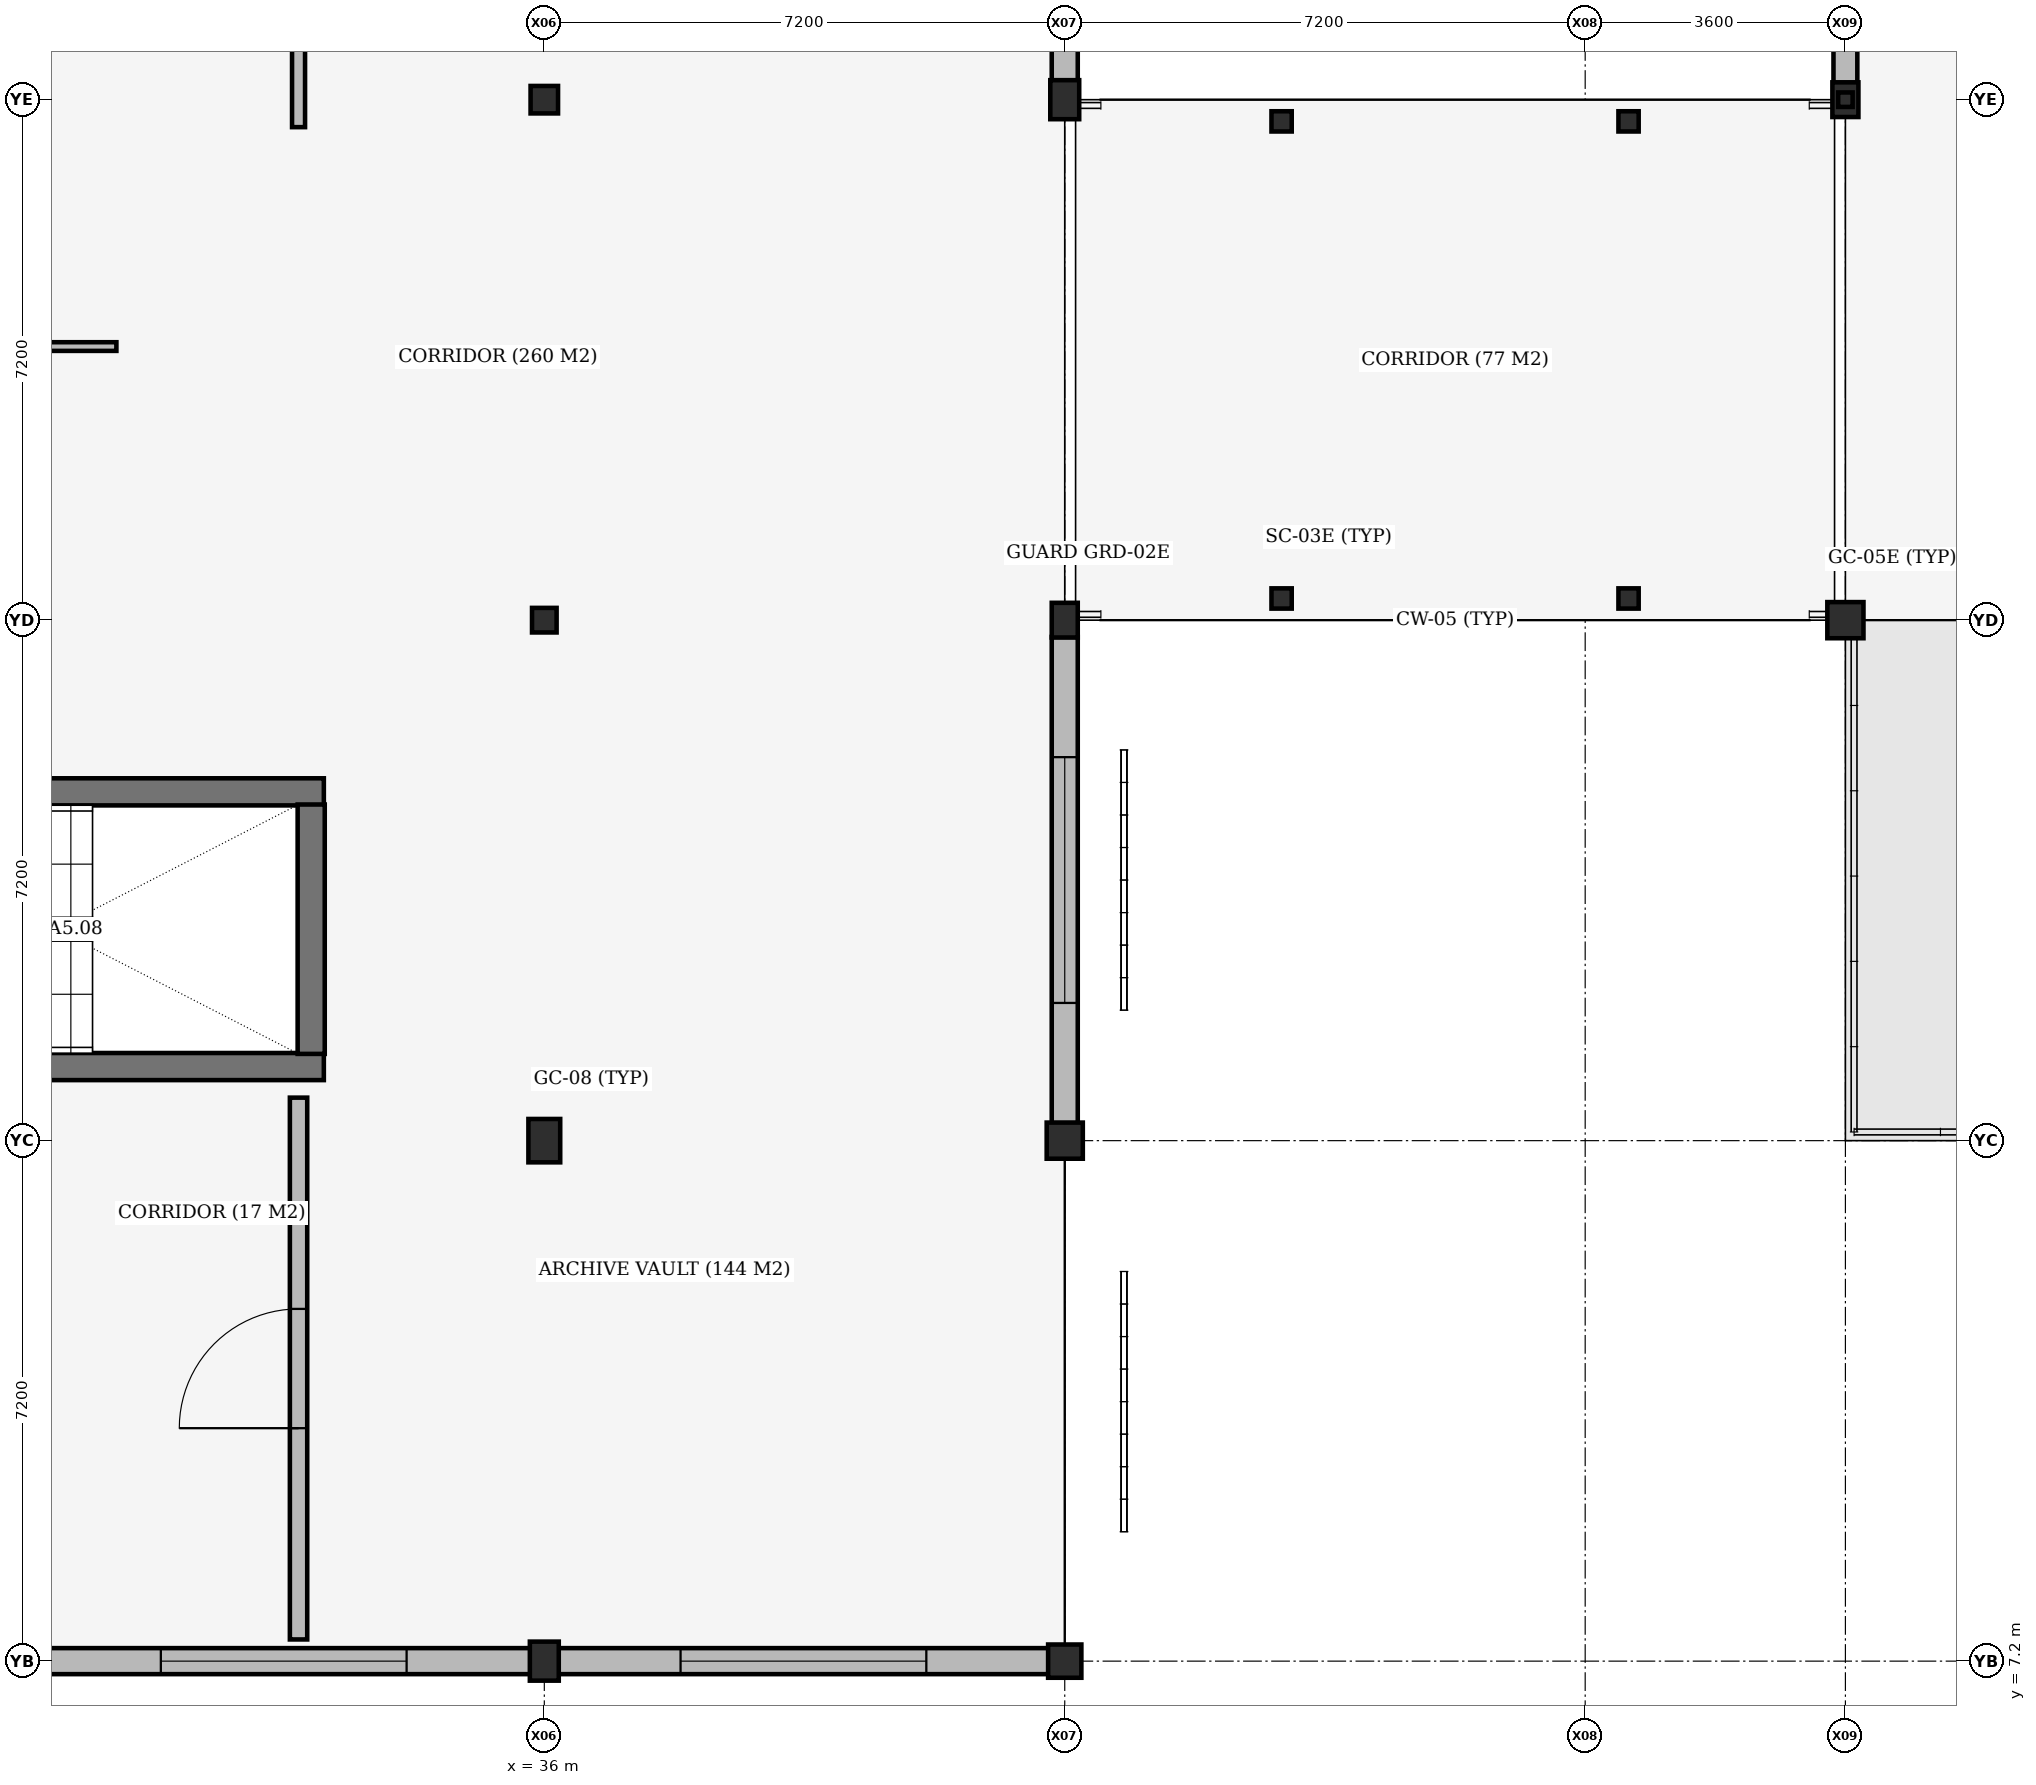
"""IFC4 building model, lengths in metres.
Left out: names, types, materials, properties, quantities, classifications, styles, units other than length and angle.
Written with IfcOpenShell. Run it as: python <this file> out.ifc"""

import sys

from ifc_helpers import new_model, si_unit, direction, frame, frame_2d, origin, origin_2d, place, context, subcontext, project, spatial, rectangle, i_section, extrude, element, fill, save


model = new_model("IFC4")
c1 = context("Model", 3, precision=1e-05, world=origin(), true_north=direction((0.0, 1.0)))
c2 = subcontext(c1, "Body", "Model", "MODEL_VIEW")
j1 = project(units=[si_unit("LENGTHUNIT", "METRE"), si_unit("PLANEANGLEUNIT", "RADIAN")], contexts=[c1])
p1 = place(None, origin())
s1 = spatial("IfcSite", under=j1, at=p1, CompositionType="ELEMENT")
p2 = place(p1, origin())
s2 = spatial("IfcBuilding", under=s1, at=p2, CompositionType="ELEMENT")
p3 = place(p2, frame((0.0, 0.0, 13.8)))
s3 = spatial("IfcBuildingStorey", under=s2, at=p3, CompositionType="ELEMENT", Elevation=13.8)
p4 = place(p3, frame((54.0, 21.6, 0.0), z_axis=(0.0, 0.0, 1.0), x_axis=(1.0, 0.0, 0.0)))
e1 = element("IfcColumn", 1, at=p4, inside=s3, PredefinedType="COLUMN", context=c2, shape_type="SweptSolid", body=[
    extrude(rectangle(XDim=0.5, YDim=0.5, at=origin_2d()), origin(), (0.0, 0.0, 1.0), 3.96),
])
p5 = place(p3, frame((54.0, 28.8, 0.0), z_axis=(0.0, 0.0, 1.0), x_axis=(1.0, 0.0, 0.0)))
e2 = element("IfcColumn", 2, at=p5, inside=s3, PredefinedType="COLUMN", context=c2, shape_type="SweptSolid", body=[
    extrude(rectangle(XDim=0.36, YDim=0.48, at=origin_2d()), origin(), (0.0, 0.0, 1.0), 3.96),
])
p6 = place(p3, frame((36.0, 7.2, 0.0), z_axis=(0.0, 0.0, 1.0), x_axis=(1.0, 0.0, 0.0)))
e3 = element("IfcColumn", 3, at=p6, inside=s3, PredefinedType="COLUMN", context=c2, shape_type="SweptSolid", body=[
    extrude(rectangle(XDim=0.4, YDim=0.54, at=origin_2d()), origin(), (0.0, 0.0, 1.0), 3.92),
])
p7 = place(p3, frame((36.0, 14.4, 0.0), z_axis=(0.0, 0.0, 1.0), x_axis=(1.0, 0.0, 0.0)))
e4 = element("IfcColumn", 4, at=p7, inside=s3, PredefinedType="COLUMN", context=c2, shape_type="SweptSolid", body=[
    extrude(rectangle(XDim=0.44, YDim=0.6, at=origin_2d()), origin(), (0.0, 0.0, 1.0), 3.92),
])
p8 = place(p3, frame((36.0, 21.6, 0.0), z_axis=(0.0, 0.0, 1.0), x_axis=(1.0, 0.0, 0.0)))
e5 = element("IfcColumn", 5, at=p8, inside=s3, PredefinedType="COLUMN", context=c2, shape_type="SweptSolid", body=[
    extrude(rectangle(XDim=0.34, YDim=0.34, at=origin_2d()), origin(), (0.0, 0.0, 1.0), 3.92),
])
p9 = place(p3, frame((36.0, 28.8, 0.0), z_axis=(0.0, 0.0, 1.0), x_axis=(1.0, 0.0, 0.0)))
e6 = element("IfcColumn", 6, at=p9, inside=s3, PredefinedType="COLUMN", context=c2, shape_type="SweptSolid", body=[
    extrude(rectangle(XDim=0.38, YDim=0.38, at=origin_2d()), origin(), (0.0, 0.0, 1.0), 3.92),
])
p10 = place(p3, frame((43.2, 7.2, 0.0), z_axis=(0.0, 0.0, 1.0), x_axis=(1.0, 0.0, 0.0)))
e7 = element("IfcColumn", 7, at=p10, inside=s3, PredefinedType="COLUMN", context=c2, shape_type="SweptSolid", body=[
    extrude(rectangle(XDim=0.46, YDim=0.46, at=origin_2d()), origin(), (0.0, 0.0, 1.0), 3.92),
])
p11 = place(p3, frame((43.2, 14.4, 0.0), z_axis=(0.0, 0.0, 1.0), x_axis=(1.0, 0.0, 0.0)))
e8 = element("IfcColumn", 8, at=p11, inside=s3, PredefinedType="COLUMN", context=c2, shape_type="SweptSolid", body=[
    extrude(rectangle(XDim=0.5, YDim=0.5, at=origin_2d()), origin(), (0.0, 0.0, 1.0), 3.92),
])
p12 = place(p3, frame((43.2, 21.6, 0.0), z_axis=(0.0, 0.0, 1.0), x_axis=(1.0, 0.0, 0.0)))
e9 = element("IfcColumn", 9, at=p12, inside=s3, PredefinedType="COLUMN", context=c2, shape_type="SweptSolid", body=[
    extrude(rectangle(XDim=0.36, YDim=0.48, at=origin_2d()), origin(), (0.0, 0.0, 1.0), 3.92),
])
p13 = place(p3, frame((43.2, 28.8, 0.0), z_axis=(0.0, 0.0, 1.0), x_axis=(1.0, 0.0, 0.0)))
e10 = element("IfcColumn", 10, at=p13, inside=s3, PredefinedType="COLUMN", context=c2, shape_type="SweptSolid", body=[
    extrude(rectangle(XDim=0.4, YDim=0.54, at=origin_2d()), origin(), (0.0, 0.0, 1.0), 3.92),
])
for number, where, z_axis, x_axis in (
    (11, (46.2, 21.9, 0.0), (0.0, 0.0, 1.0), (1.0, 0.0, 0.0)),
    (12, (51.0, 21.9, 0.0), (0.0, 0.0, 1.0), (1.0, 0.0, 0.0)),
    (13, (46.2, 28.5, 0.0), (0.0, 0.0, 1.0), (1.0, 0.0, 0.0)),
    (14, (51.0, 28.5, 0.0), (0.0, 0.0, 1.0), (1.0, 0.0, 0.0)),
):
    element("IfcColumn", number, at=place(p3, frame(where, z_axis=z_axis, x_axis=x_axis)), inside=s3, PredefinedType="COLUMN", context=c2, shape_type="SweptSolid", body=[
        extrude(i_section(OverallWidth=0.28, OverallDepth=0.28, WebThickness=0.01, FlangeThickness=0.018, FilletRadius=0.024, at=origin_2d()), origin(), (0.0, 0.0, 1.0), 3.96),
    ])
for number, where, z_axis, x_axis in (
    (15, (23.85, 15.425, 0.0), (0.0, 0.0, 1.0), (1.0, 0.0, 0.0)),
    (16, (32.95, 19.225, 0.0), (0.0, 0.0, 1.0), (-1.0, 0.0, 0.0)),
):
    element("IfcWall", number, at=place(p3, frame(where, z_axis=z_axis, x_axis=x_axis)), inside=s3, PredefinedType="SHEAR", context=c2, shape_type="SweptSolid", body=[
        extrude(rectangle(XDim=9.1, YDim=0.375, at=frame_2d((4.55, 0.0))), origin(), (0.0, 0.0, 1.0), 3.92),
    ])
p14 = place(p3, frame((32.775, 15.6, 0.0), z_axis=(0.0, 0.0, 1.0), x_axis=(0.0, 1.0, 0.0)))
e17 = element("IfcWall", 17, at=p14, inside=s3, PredefinedType="SHEAR", context=c2, shape_type="SweptSolid", body=[
    extrude(rectangle(XDim=3.45, YDim=0.375, at=frame_2d((1.725, 0.0))), origin(), (0.0, 0.0, 1.0), 3.92),
])
p15 = place(p3, frame((54.0, 28.8, 3.96), z_axis=(0.0, 0.0, 1.0), x_axis=(1.0, 0.0, 0.0)))
e18 = element("IfcColumn", 18, at=p15, inside=s3, PredefinedType="COLUMN", context=c2, shape_type="SweptSolid", body=[
    extrude(i_section(OverallWidth=0.2, OverallDepth=0.2, WebThickness=0.009, FlangeThickness=0.015, FilletRadius=0.018, at=origin_2d()), origin(), (0.0, 0.0, 1.0), 2.235),
])
p16 = place(p3, frame((54.0, 29.032, 0.0), z_axis=(0.0, 0.0, 1.0), x_axis=(0.0, 1.0, 0.0)))
e19 = element("IfcWall", 19, at=p16, inside=s3, PredefinedType="STANDARD", context=c2, shape_type="SweptSolid", body=[
    extrude(rectangle(XDim=6.706, YDim=0.33, at=frame_2d((3.353, 0.0))), origin(), (0.0, 0.0, 1.0), 3.96),
])
p17 = place(p16, frame((1.203, 0.0, 0.85)))
e20 = element("IfcOpeningElement", 20, at=p17, cuts=e19, PredefinedType="OPENING", context=c2, shape_type="SweptSolid", body=[
    extrude(rectangle(XDim=1.75, YDim=2.45, at=frame_2d((0.875, 1.225))), frame((0.0, 0.175, 0.0), z_axis=(0.0, -1.0, 0.0), x_axis=(1.0, 0.0, 0.0)), (0.0, 0.0, 1.0), 0.35),
])
p18 = place(p16, frame((3.753, 0.0, 0.85)))
e21 = element("IfcOpeningElement", 21, at=p18, cuts=e19, PredefinedType="OPENING", context=c2, shape_type="SweptSolid", body=[
    extrude(rectangle(XDim=1.75, YDim=2.45, at=frame_2d((0.875, 1.225))), frame((0.0, 0.175, 0.0), z_axis=(0.0, -1.0, 0.0), x_axis=(1.0, 0.0, 0.0)), (0.0, 0.0, 1.0), 0.35),
])
p19 = place(p3, frame((35.808, 7.2, 0.0), z_axis=(0.0, 0.0, 1.0), x_axis=(-1.0, 0.0, 0.0)))
e22 = element("IfcWall", 22, at=p19, inside=s3, PredefinedType="STANDARD", context=c2, shape_type="SweptSolid", body=[
    extrude(rectangle(XDim=6.826, YDim=0.36, at=frame_2d((3.413, 0.0))), origin(), (0.0, 0.0, 1.0), 3.4),
])
p20 = place(p19, frame((1.713, 0.0, 0.9)))
e23 = element("IfcOpeningElement", 23, at=p20, cuts=e22, PredefinedType="OPENING", context=c2, shape_type="SweptSolid", body=[
    extrude(rectangle(XDim=3.4, YDim=1.5, at=frame_2d((1.7, 0.75))), frame((0.0, 0.19, 0.0), z_axis=(0.0, -1.0, 0.0), x_axis=(1.0, 0.0, 0.0)), (0.0, 0.0, 1.0), 0.38),
])
p21 = place(p3, frame((42.978, 7.2, 0.0), z_axis=(0.0, 0.0, 1.0), x_axis=(-1.0, 0.0, 0.0)))
e24 = element("IfcWall", 24, at=p21, inside=s3, PredefinedType="STANDARD", context=c2, shape_type="SweptSolid", body=[
    extrude(rectangle(XDim=6.786, YDim=0.36, at=frame_2d((3.393, 0.0))), origin(), (0.0, 0.0, 1.0), 3.34),
])
p22 = place(p21, frame((1.693, 0.0, 0.9)))
e25 = element("IfcOpeningElement", 25, at=p22, cuts=e24, PredefinedType="OPENING", context=c2, shape_type="SweptSolid", body=[
    extrude(rectangle(XDim=3.4, YDim=1.5, at=frame_2d((1.7, 0.75))), frame((0.0, 0.19, 0.0), z_axis=(0.0, -1.0, 0.0), x_axis=(1.0, 0.0, 0.0)), (0.0, 0.0, 1.0), 0.38),
])
p23 = place(p3, frame((43.2, 21.368, 0.0), z_axis=(0.0, 0.0, 1.0), x_axis=(0.0, -1.0, 0.0)))
e26 = element("IfcWall", 26, at=p23, inside=s3, PredefinedType="STANDARD", context=c2, shape_type="SweptSolid", body=[
    extrude(rectangle(XDim=6.726, YDim=0.36, at=frame_2d((3.363, 0.0))), origin(), (0.0, 0.0, 1.0), 3.18),
])
p24 = place(p23, frame((1.663, 0.0, 0.9)))
e27 = element("IfcOpeningElement", 27, at=p24, cuts=e26, PredefinedType="OPENING", context=c2, shape_type="SweptSolid", body=[
    extrude(rectangle(XDim=3.4, YDim=1.5, at=frame_2d((1.7, 0.75))), frame((0.0, 0.19, 0.0), z_axis=(0.0, -1.0, 0.0), x_axis=(1.0, 0.0, 0.0)), (0.0, 0.0, 1.0), 0.38),
])
p25 = place(p3, frame((43.2, 35.708, 0.0), z_axis=(0.0, 0.0, 1.0), x_axis=(0.0, -1.0, 0.0)))
e28 = element("IfcWall", 28, at=p25, inside=s3, PredefinedType="STANDARD", context=c2, shape_type="SweptSolid", body=[
    extrude(rectangle(XDim=6.646, YDim=0.36, at=frame_2d((3.323, 0.0))), origin(), (0.0, 0.0, 1.0), 3.34),
])
p26 = place(p25, frame((1.573, 0.0, 0.95)))
e29 = element("IfcOpeningElement", 29, at=p26, cuts=e28, PredefinedType="OPENING", context=c2, shape_type="SweptSolid", body=[
    extrude(rectangle(XDim=1.35, YDim=2.0, at=frame_2d((0.675, 1.0))), frame((0.0, 0.19, 0.0), z_axis=(0.0, -1.0, 0.0), x_axis=(1.0, 0.0, 0.0)), (0.0, 0.0, 1.0), 0.38),
])
p27 = place(p25, frame((3.723, 0.0, 0.95)))
e30 = element("IfcOpeningElement", 30, at=p27, cuts=e28, PredefinedType="OPENING", context=c2, shape_type="SweptSolid", body=[
    extrude(rectangle(XDim=1.35, YDim=2.0, at=frame_2d((0.675, 1.0))), frame((0.0, 0.19, 0.0), z_axis=(0.0, -1.0, 0.0), x_axis=(1.0, 0.0, 0.0)), (0.0, 0.0, 1.0), 0.38),
])
p28 = place(p3, frame((11.13, 25.385, 0.0), z_axis=(0.0, 0.0, 1.0), x_axis=(1.0, 0.0, 0.0)))
e31 = element("IfcWall", 31, at=p28, inside=s3, PredefinedType="PARTITIONING", context=c2, shape_type="SweptSolid", body=[
    extrude(rectangle(XDim=18.95, YDim=0.12, at=frame_2d((9.475, 0.0))), origin(), (0.0, 0.0, 1.0), 3.18),
])
p29 = place(p3, frame((32.6, 7.5, 0.0), z_axis=(0.0, 0.0, 1.0), x_axis=(0.0, 1.0, 0.0)))
e32 = element("IfcWall", 32, at=p29, inside=s3, PredefinedType="STANDARD", context=c2, shape_type="SweptSolid", body=[
    extrude(rectangle(XDim=7.495, YDim=0.24, at=frame_2d((3.748, 0.0))), origin(), (0.0, 0.0, 1.0), 3.34),
])
p30 = place(p29, frame((2.923, 0.0, 0.0)))
e33 = element("IfcOpeningElement", 33, at=p30, cuts=e32, PredefinedType="OPENING", context=c2, shape_type="SweptSolid", body=[
    extrude(rectangle(XDim=1.65, YDim=2.25, at=frame_2d((0.825, 1.125))), frame((0.0, 0.13, 0.0), z_axis=(0.0, -1.0, 0.0), x_axis=(1.0, 0.0, 0.0)), (0.0, 0.0, 1.0), 0.26),
])
p31 = place(p3, frame((32.6, 28.42, 0.0), z_axis=(0.0, 0.0, 1.0), x_axis=(0.0, 1.0, 0.0)))
e34 = element("IfcWall", 34, at=p31, inside=s3, PredefinedType="PARTITIONING", context=c2, shape_type="SweptSolid", body=[
    extrude(rectangle(XDim=18.427, YDim=0.18, at=frame_2d((9.213, 0.0))), origin(), (0.0, 0.0, 1.0), 3.18),
])
p32 = place(p31, frame((8.723, 0.0, 0.0)))
e35 = element("IfcOpeningElement", 35, at=p32, cuts=e34, PredefinedType="OPENING", context=c2, shape_type="SweptSolid", body=[
    extrude(rectangle(XDim=0.98, YDim=2.18, at=frame_2d((0.49, 1.09))), frame((0.0, 0.1, 0.0), z_axis=(0.0, -1.0, 0.0), x_axis=(1.0, 0.0, 0.0)), (0.0, 0.0, 1.0), 0.2),
])
p33 = place(p20, origin())
e36 = element("IfcWindow", 36, at=p33, inside=s3, PartitioningType="DOUBLE_PANEL_VERTICAL", PredefinedType="WINDOW", context=c2, shape_type="SweptSolid", body=[
    extrude(rectangle(XDim=3.4, YDim=1.5, at=frame_2d((1.7, 0.75))), frame((0.0, 0.03, 0.0), z_axis=(0.0, -1.0, 0.0), x_axis=(1.0, 0.0, 0.0)), (0.0, 0.0, 1.0), 0.06),
])
fill(e23, e36)
p34 = place(p22, origin())
e37 = element("IfcWindow", 37, at=p34, inside=s3, PartitioningType="DOUBLE_PANEL_VERTICAL", PredefinedType="WINDOW", context=c2, shape_type="SweptSolid", body=[
    extrude(rectangle(XDim=3.4, YDim=1.5, at=frame_2d((1.7, 0.75))), frame((0.0, 0.03, 0.0), z_axis=(0.0, -1.0, 0.0), x_axis=(1.0, 0.0, 0.0)), (0.0, 0.0, 1.0), 0.06),
])
fill(e25, e37)
p35 = place(p24, origin())
e38 = element("IfcWindow", 38, at=p35, inside=s3, PartitioningType="DOUBLE_PANEL_VERTICAL", PredefinedType="WINDOW", context=c2, shape_type="SweptSolid", body=[
    extrude(rectangle(XDim=3.4, YDim=1.5, at=frame_2d((1.7, 0.75))), frame((0.0, 0.03, 0.0), z_axis=(0.0, -1.0, 0.0), x_axis=(1.0, 0.0, 0.0)), (0.0, 0.0, 1.0), 0.06),
])
fill(e27, e38)
p36 = place(p30, origin())
e39 = element("IfcDoor", 39, at=p36, inside=s3, OperationType="DOUBLE_DOOR_SINGLE_SWING", PredefinedType="DOOR", context=c2, shape_type="SweptSolid", body=[
    extrude(rectangle(XDim=1.65, YDim=2.25, at=frame_2d((0.825, 1.125))), frame((0.0, 0.025, 0.0), z_axis=(0.0, -1.0, 0.0), x_axis=(1.0, 0.0, 0.0)), (0.0, 0.0, 1.0), 0.05),
])
fill(e33, e39)
save(model, sys.argv[1])
